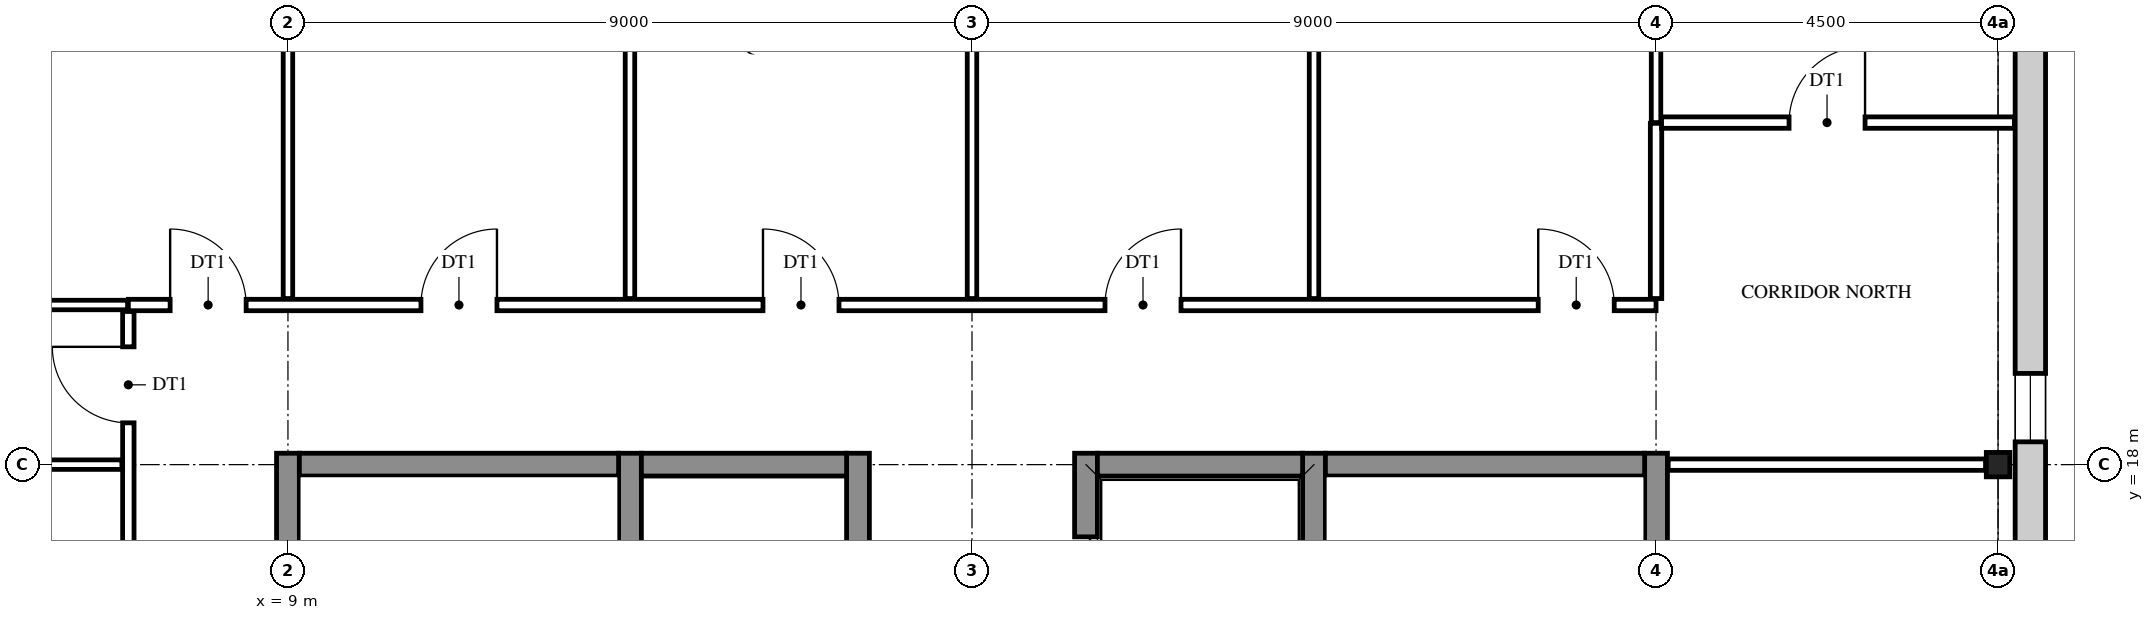
"""IFC4 building model, lengths in metres.
Left out: names, types, materials, properties, quantities, classifications, styles, units other than length and angle.
Written with IfcOpenShell. Run it as: python <this file> out.ifc"""

import sys

from ifc_helpers import new_model, si_unit, direction, frame, frame_2d, origin, origin_2d, place, context, subcontext, project, spatial, rectangle, i_section, extrude, element, fill, save


model = new_model("IFC4")
c1 = context("Model", 3, precision=1e-05, world=origin(), true_north=direction((0.0, 1.0)))
c2 = subcontext(c1, "Body", "Model", "MODEL_VIEW")
j1 = project(units=[si_unit("LENGTHUNIT", "METRE"), si_unit("PLANEANGLEUNIT", "RADIAN")], contexts=[c1])
p1 = place(None, origin())
s1 = spatial("IfcSite", under=j1, at=p1, CompositionType="ELEMENT")
p2 = place(p1, origin())
s2 = spatial("IfcBuilding", under=s1, at=p2, CompositionType="ELEMENT")
p3 = place(p2, frame((0.0, 0.0, 52.8)))
s3 = spatial("IfcBuildingStorey", under=s2, at=p3, CompositionType="ELEMENT", Elevation=52.8)
p4 = place(p3, frame((31.5, 18.0, 0.0), z_axis=(0.0, 0.0, 1.0), x_axis=(1.0, 0.0, 0.0)))
e1 = element("IfcColumn", 1, at=p4, inside=s3, PredefinedType="COLUMN", context=c2, shape_type="SweptSolid", body=[
    extrude(i_section(OverallWidth=0.309, OverallDepth=0.321, WebThickness=0.014, FlangeThickness=0.022, FilletRadius=0.017, at=origin_2d()), origin(), (0.0, 0.0, 1.0), 4.2),
])
for number, where, z_axis, x_axis in (
    (2, (9.0, 8.85, 0.0), (0.0, 0.0, 1.0), (0.0, 1.0, 0.0)),
    (3, (13.5, 8.85, 0.0), (0.0, 0.0, 1.0), (0.0, 1.0, 0.0)),
):
    element("IfcWall", number, at=place(p3, frame(where, z_axis=z_axis, x_axis=x_axis)), inside=s3, PredefinedType="SHEAR", context=c2, shape_type="SweptSolid", body=[
        extrude(rectangle(XDim=9.3, YDim=0.3, at=frame_2d((4.65, 0.0))), origin(), (0.0, 0.0, 1.0), 4.2),
    ])
p5 = place(p3, frame((16.5, 8.85, 0.0), z_axis=(0.0, 0.0, 1.0), x_axis=(0.0, 1.0, 0.0)))
e4 = element("IfcWall", 4, at=p5, inside=s3, PredefinedType="SHEAR", context=c2, shape_type="SweptSolid", body=[
    extrude(rectangle(XDim=9.3, YDim=0.3, at=frame_2d((4.65, 0.0))), origin(), (0.0, 0.0, 1.0), 4.2),
])
p6 = place(p5, frame((1.1, 0.0, 0.0)))
e5 = element("IfcOpeningElement", 5, at=p6, cuts=e4, PredefinedType="OPENING", context=c2, shape_type="SweptSolid", body=[
    extrude(rectangle(XDim=1.1, YDim=2.1, at=frame_2d((0.55, 1.05))), frame((0.0, 0.16, 0.0), z_axis=(0.0, -1.0, 0.0), x_axis=(1.0, 0.0, 0.0)), (0.0, 0.0, 1.0), 0.32),
])
p7 = place(p5, frame((4.1, 0.0, 0.0)))
e6 = element("IfcOpeningElement", 6, at=p7, cuts=e4, PredefinedType="OPENING", context=c2, shape_type="SweptSolid", body=[
    extrude(rectangle(XDim=1.1, YDim=2.1, at=frame_2d((0.55, 1.05))), frame((0.0, 0.16, 0.0), z_axis=(0.0, -1.0, 0.0), x_axis=(1.0, 0.0, 0.0)), (0.0, 0.0, 1.0), 0.32),
])
p8 = place(p3, frame((19.5, 8.85, 0.0), z_axis=(0.0, 0.0, 1.0), x_axis=(0.0, 1.0, 0.0)))
e7 = element("IfcWall", 7, at=p8, inside=s3, PredefinedType="SHEAR", context=c2, shape_type="SweptSolid", body=[
    extrude(rectangle(XDim=9.3, YDim=0.3, at=frame_2d((4.65, 0.0))), origin(), (0.0, 0.0, 1.0), 4.2),
])
p9 = place(p8, frame((3.95, 0.0, 0.0)))
e8 = element("IfcOpeningElement", 8, at=p9, cuts=e7, PredefinedType="OPENING", context=c2, shape_type="SweptSolid", body=[
    extrude(rectangle(XDim=1.4, YDim=2.1, at=frame_2d((0.7, 1.05))), frame((0.0, 0.16, 0.0), z_axis=(0.0, -1.0, 0.0), x_axis=(1.0, 0.0, 0.0)), (0.0, 0.0, 1.0), 0.32),
])
p10 = place(p8, frame((7.1, 0.0, 0.0)))
e9 = element("IfcOpeningElement", 9, at=p10, cuts=e7, PredefinedType="OPENING", context=c2, shape_type="SweptSolid", body=[
    extrude(rectangle(XDim=1.1, YDim=2.1, at=frame_2d((0.55, 1.05))), frame((0.0, 0.16, 0.0), z_axis=(0.0, -1.0, 0.0), x_axis=(1.0, 0.0, 0.0)), (0.0, 0.0, 1.0), 0.32),
])
for number, where, z_axis, x_axis in (
    (10, (22.5, 8.85, 0.0), (0.0, 0.0, 1.0), (0.0, 1.0, 0.0)),
    (11, (27.0, 8.85, 0.0), (0.0, 0.0, 1.0), (0.0, 1.0, 0.0)),
):
    element("IfcWall", number, at=place(p3, frame(where, z_axis=z_axis, x_axis=x_axis)), inside=s3, PredefinedType="SHEAR", context=c2, shape_type="SweptSolid", body=[
        extrude(rectangle(XDim=9.3, YDim=0.3, at=frame_2d((4.65, 0.0))), origin(), (0.0, 0.0, 1.0), 4.2),
    ])
p11 = place(p3, frame((9.15, 18.0, 0.0), z_axis=(0.0, 0.0, 1.0), x_axis=(1.0, 0.0, 0.0)))
e12 = element("IfcWall", 12, at=p11, inside=s3, PredefinedType="SHEAR", context=c2, shape_type="SweptSolid", body=[
    extrude(rectangle(XDim=4.2, YDim=0.3, at=frame_2d((2.1, 0.0))), origin(), (0.0, 0.0, 1.0), 4.2),
])
for number, where, z_axis, x_axis in (
    (13, (13.65, 18.0, 0.0), (0.0, 0.0, 1.0), (1.0, 0.0, 0.0)),
    (14, (19.65, 18.0, 0.0), (0.0, 0.0, 1.0), (1.0, 0.0, 0.0)),
):
    element("IfcWall", number, at=place(p3, frame(where, z_axis=z_axis, x_axis=x_axis)), inside=s3, PredefinedType="SHEAR", context=c2, shape_type="SweptSolid", body=[
        extrude(rectangle(XDim=2.7, YDim=0.3, at=frame_2d((1.35, 0.0))), origin(), (0.0, 0.0, 1.0), 4.2),
    ])
p12 = place(p3, frame((22.65, 18.0, 0.0), z_axis=(0.0, 0.0, 1.0), x_axis=(1.0, 0.0, 0.0)))
e15 = element("IfcWall", 15, at=p12, inside=s3, PredefinedType="SHEAR", context=c2, shape_type="SweptSolid", body=[
    extrude(rectangle(XDim=4.2, YDim=0.3, at=frame_2d((2.1, 0.0))), origin(), (0.0, 0.0, 1.0), 4.2),
])
p13 = place(p3, frame((31.925, 27.225, 0.0), z_axis=(0.0, 0.0, 1.0), x_axis=(0.0, -1.0, 0.0)))
e16 = element("IfcWall", 16, at=p13, inside=s3, PredefinedType="STANDARD", context=c2, shape_type="SweptSolid", body=[
    extrude(rectangle(XDim=27.45, YDim=0.4, at=frame_2d((13.725, 0.0))), origin(), (0.0, 0.0, 1.0), 4.2),
])
p14 = place(p13, frame((26.025, 0.0, 0.9)))
e17 = element("IfcOpeningElement", 17, at=p14, cuts=e16, PredefinedType="OPENING", context=c2, shape_type="SweptSolid", body=[
    extrude(rectangle(XDim=0.9, YDim=2.0, at=frame_2d((0.45, 1.0))), frame((0.0, 0.21, 0.0), z_axis=(0.0, -1.0, 0.0), x_axis=(1.0, 0.0, 0.0)), (0.0, 0.0, 1.0), 0.42),
])
p15 = place(p13, frame((18.525, 0.0, 0.9)))
e18 = element("IfcOpeningElement", 18, at=p15, cuts=e16, PredefinedType="OPENING", context=c2, shape_type="SweptSolid", body=[
    extrude(rectangle(XDim=0.9, YDim=2.0, at=frame_2d((0.45, 1.0))), frame((0.0, 0.21, 0.0), z_axis=(0.0, -1.0, 0.0), x_axis=(1.0, 0.0, 0.0)), (0.0, 0.0, 1.0), 0.42),
])
p16 = place(p13, frame((15.675, 0.0, 1.6)))
e19 = element("IfcOpeningElement", 19, at=p16, cuts=e16, PredefinedType="OPENING", context=c2, shape_type="SweptSolid", body=[
    extrude(rectangle(XDim=0.6, YDim=0.9, at=frame_2d((0.3, 0.45))), frame((0.0, 0.21, 0.0), z_axis=(0.0, -1.0, 0.0), x_axis=(1.0, 0.0, 0.0)), (0.0, 0.0, 1.0), 0.42),
])
p17 = place(p13, frame((11.175, 0.0, 1.6)))
e20 = element("IfcOpeningElement", 20, at=p17, cuts=e16, PredefinedType="OPENING", context=c2, shape_type="SweptSolid", body=[
    extrude(rectangle(XDim=0.6, YDim=0.9, at=frame_2d((0.3, 0.45))), frame((0.0, 0.21, 0.0), z_axis=(0.0, -1.0, 0.0), x_axis=(1.0, 0.0, 0.0)), (0.0, 0.0, 1.0), 0.42),
])
p18 = place(p13, frame((8.025, 0.0, 0.9)))
e21 = element("IfcOpeningElement", 21, at=p18, cuts=e16, PredefinedType="OPENING", context=c2, shape_type="SweptSolid", body=[
    extrude(rectangle(XDim=0.9, YDim=2.0, at=frame_2d((0.45, 1.0))), frame((0.0, 0.21, 0.0), z_axis=(0.0, -1.0, 0.0), x_axis=(1.0, 0.0, 0.0)), (0.0, 0.0, 1.0), 0.42),
])
p19 = place(p13, frame((0.525, 0.0, 0.9)))
e22 = element("IfcOpeningElement", 22, at=p19, cuts=e16, PredefinedType="OPENING", context=c2, shape_type="SweptSolid", body=[
    extrude(rectangle(XDim=0.9, YDim=2.0, at=frame_2d((0.45, 1.0))), frame((0.0, 0.21, 0.0), z_axis=(0.0, -1.0, 0.0), x_axis=(1.0, 0.0, 0.0)), (0.0, 0.0, 1.0), 0.42),
])
p20 = place(p3, frame((6.9, 6.985, 0.0), z_axis=(0.0, 0.0, 1.0), x_axis=(0.0, 1.0, 0.0)))
e23 = element("IfcWall", 23, at=p20, inside=s3, PredefinedType="PARTITIONING", context=c2, shape_type="SweptSolid", body=[
    extrude(rectangle(XDim=13.03, YDim=0.15, at=frame_2d((6.515, 0.0))), origin(), (0.0, 0.0, 1.0), 3.542),
])
p21 = place(p20, frame((11.565, 0.0, 0.0)))
e24 = element("IfcOpeningElement", 24, at=p21, cuts=e23, PredefinedType="OPENING", context=c2, shape_type="SweptSolid", body=[
    extrude(rectangle(XDim=1.0, YDim=2.1, at=frame_2d((0.5, 1.05))), frame((0.0, 0.085, 0.0), z_axis=(0.0, -1.0, 0.0), x_axis=(1.0, 0.0, 0.0)), (0.0, 0.0, 1.0), 0.17),
])
p22 = place(p20, frame((3.765, 0.0, 0.0)))
e25 = element("IfcOpeningElement", 25, at=p22, cuts=e23, PredefinedType="OPENING", context=c2, shape_type="SweptSolid", body=[
    extrude(rectangle(XDim=1.0, YDim=2.1, at=frame_2d((0.5, 1.05))), frame((0.0, 0.085, 0.0), z_axis=(0.0, -1.0, 0.0), x_axis=(1.0, 0.0, 0.0)), (0.0, 0.0, 1.0), 0.17),
])
p23 = place(p20, frame((8.265, 0.0, 0.0)))
e26 = element("IfcOpeningElement", 26, at=p23, cuts=e23, PredefinedType="OPENING", context=c2, shape_type="SweptSolid", body=[
    extrude(rectangle(XDim=1.0, YDim=2.1, at=frame_2d((0.5, 1.05))), frame((0.0, 0.085, 0.0), z_axis=(0.0, -1.0, 0.0), x_axis=(1.0, 0.0, 0.0)), (0.0, 0.0, 1.0), 0.17),
])
p24 = place(p3, frame((9.0, 20.185, 0.0), z_axis=(0.0, 0.0, 1.0), x_axis=(0.0, 1.0, 0.0)))
e27 = element("IfcWall", 27, at=p24, inside=s3, PredefinedType="PARTITIONING", context=c2, shape_type="SweptSolid", body=[
    extrude(rectangle(XDim=6.645, YDim=0.125, at=frame_2d((3.322, 0.0))), origin(), (0.0, 0.0, 1.0), 3.542),
])
p25 = place(p3, frame((13.5, 20.185, 0.0), z_axis=(0.0, 0.0, 1.0), x_axis=(0.0, 1.0, 0.0)))
e28 = element("IfcWall", 28, at=p25, inside=s3, PredefinedType="PARTITIONING", context=c2, shape_type="SweptSolid", body=[
    extrude(rectangle(XDim=7.041, YDim=0.125, at=frame_2d((3.521, 0.0))), origin(), (0.0, 0.0, 1.0), 3.542),
])
p26 = place(p3, frame((18.0, 20.185, 0.0), z_axis=(0.0, 0.0, 1.0), x_axis=(0.0, 1.0, 0.0)))
e29 = element("IfcWall", 29, at=p26, inside=s3, PredefinedType="PARTITIONING", context=c2, shape_type="SweptSolid", body=[
    extrude(rectangle(XDim=6.645, YDim=0.125, at=frame_2d((3.322, 0.0))), origin(), (0.0, 0.0, 1.0), 3.542),
])
p27 = place(p3, frame((22.5, 20.185, 0.0), z_axis=(0.0, 0.0, 1.0), x_axis=(0.0, 1.0, 0.0)))
e30 = element("IfcWall", 30, at=p27, inside=s3, PredefinedType="PARTITIONING", context=c2, shape_type="SweptSolid", body=[
    extrude(rectangle(XDim=7.041, YDim=0.125, at=frame_2d((3.521, 0.0))), origin(), (0.0, 0.0, 1.0), 3.542),
])
p28 = place(p3, frame((27.0, 20.185, 0.0), z_axis=(0.0, 0.0, 1.0), x_axis=(0.0, 1.0, 0.0)))
e31 = element("IfcWall", 31, at=p28, inside=s3, PredefinedType="PARTITIONING", context=c2, shape_type="SweptSolid", body=[
    extrude(rectangle(XDim=2.305, YDim=0.15, at=frame_2d((1.152, 0.0))), origin(), (0.0, 0.0, 1.0), 3.542),
])
p29 = place(p3, frame((27.0, 22.5, 0.0), z_axis=(0.0, 0.0, 1.0), x_axis=(0.0, 1.0, 0.0)))
e32 = element("IfcWall", 32, at=p29, inside=s3, PredefinedType="PARTITIONING", context=c2, shape_type="SweptSolid", body=[
    extrude(rectangle(XDim=4.33, YDim=0.125, at=frame_2d((2.165, 0.0))), origin(), (0.0, 0.0, 1.0), 3.542),
])
p30 = place(p3, frame((0.165, 18.0, 0.0), z_axis=(0.0, 0.0, 1.0), x_axis=(1.0, 0.0, 0.0)))
e33 = element("IfcWall", 33, at=p30, inside=s3, PredefinedType="PARTITIONING", context=c2, shape_type="SweptSolid", body=[
    extrude(rectangle(XDim=6.65, YDim=0.125, at=frame_2d((3.325, 0.0))), origin(), (0.0, 0.0, 1.0), 3.542),
])
p31 = place(p3, frame((27.16, 18.0, 0.0), z_axis=(0.0, 0.0, 1.0), x_axis=(1.0, 0.0, 0.0)))
e34 = element("IfcWall", 34, at=p31, inside=s3, PredefinedType="PARTITIONING", context=c2, shape_type="SweptSolid", body=[
    extrude(rectangle(XDim=4.176, YDim=0.15, at=frame_2d((2.088, 0.0))), origin(), (0.0, 0.0, 1.0), 3.542),
])
p32 = place(p3, frame((4.573, 20.1, 0.0), z_axis=(0.0, 0.0, 1.0), x_axis=(1.0, 0.0, 0.0)))
e35 = element("IfcWall", 35, at=p32, inside=s3, PredefinedType="PARTITIONING", context=c2, shape_type="SweptSolid", body=[
    extrude(rectangle(XDim=2.317, YDim=0.125, at=frame_2d((1.159, 0.0))), origin(), (0.0, 0.0, 1.0), 3.542),
])
p33 = place(p3, frame((6.9, 20.1, 0.0), z_axis=(0.0, 0.0, 1.0), x_axis=(1.0, 0.0, 0.0)))
e36 = element("IfcWall", 36, at=p33, inside=s3, PredefinedType="PARTITIONING", context=c2, shape_type="SweptSolid", body=[
    extrude(rectangle(XDim=20.1, YDim=0.15, at=frame_2d((10.05, 0.0))), origin(), (0.0, 0.0, 1.0), 3.542),
])
p34 = place(p33, frame((0.55, 0.0, 0.0)))
e37 = element("IfcOpeningElement", 37, at=p34, cuts=e36, PredefinedType="OPENING", context=c2, shape_type="SweptSolid", body=[
    extrude(rectangle(XDim=1.0, YDim=2.1, at=frame_2d((0.5, 1.05))), frame((0.0, 0.085, 0.0), z_axis=(0.0, -1.0, 0.0), x_axis=(1.0, 0.0, 0.0)), (0.0, 0.0, 1.0), 0.17),
])
p35 = place(p33, frame((3.85, 0.0, 0.0)))
e38 = element("IfcOpeningElement", 38, at=p35, cuts=e36, PredefinedType="OPENING", context=c2, shape_type="SweptSolid", body=[
    extrude(rectangle(XDim=1.0, YDim=2.1, at=frame_2d((0.5, 1.05))), frame((0.0, 0.085, 0.0), z_axis=(0.0, -1.0, 0.0), x_axis=(1.0, 0.0, 0.0)), (0.0, 0.0, 1.0), 0.17),
])
p36 = place(p33, frame((8.35, 0.0, 0.0)))
e39 = element("IfcOpeningElement", 39, at=p36, cuts=e36, PredefinedType="OPENING", context=c2, shape_type="SweptSolid", body=[
    extrude(rectangle(XDim=1.0, YDim=2.1, at=frame_2d((0.5, 1.05))), frame((0.0, 0.085, 0.0), z_axis=(0.0, -1.0, 0.0), x_axis=(1.0, 0.0, 0.0)), (0.0, 0.0, 1.0), 0.17),
])
p37 = place(p33, frame((12.85, 0.0, 0.0)))
e40 = element("IfcOpeningElement", 40, at=p37, cuts=e36, PredefinedType="OPENING", context=c2, shape_type="SweptSolid", body=[
    extrude(rectangle(XDim=1.0, YDim=2.1, at=frame_2d((0.5, 1.05))), frame((0.0, 0.085, 0.0), z_axis=(0.0, -1.0, 0.0), x_axis=(1.0, 0.0, 0.0)), (0.0, 0.0, 1.0), 0.17),
])
p38 = place(p33, frame((18.55, 0.0, 0.0)))
e41 = element("IfcOpeningElement", 41, at=p38, cuts=e36, PredefinedType="OPENING", context=c2, shape_type="SweptSolid", body=[
    extrude(rectangle(XDim=1.0, YDim=2.1, at=frame_2d((0.5, 1.05))), frame((0.0, 0.085, 0.0), z_axis=(0.0, -1.0, 0.0), x_axis=(1.0, 0.0, 0.0)), (0.0, 0.0, 1.0), 0.17),
])
p39 = place(p3, frame((27.073, 22.5, 0.0), z_axis=(0.0, 0.0, 1.0), x_axis=(1.0, 0.0, 0.0)))
e42 = element("IfcWall", 42, at=p39, inside=s3, PredefinedType="PARTITIONING", context=c2, shape_type="SweptSolid", body=[
    extrude(rectangle(XDim=4.643, YDim=0.15, at=frame_2d((2.321, 0.0))), origin(), (0.0, 0.0, 1.0), 3.542),
])
p40 = place(p39, frame((1.677, 0.0, 0.0)))
e43 = element("IfcOpeningElement", 43, at=p40, cuts=e42, PredefinedType="OPENING", context=c2, shape_type="SweptSolid", body=[
    extrude(rectangle(XDim=1.0, YDim=2.1, at=frame_2d((0.5, 1.05))), frame((0.0, 0.085, 0.0), z_axis=(0.0, -1.0, 0.0), x_axis=(1.0, 0.0, 0.0)), (0.0, 0.0, 1.0), 0.17),
])
p41 = place(p18, origin())
e44 = element("IfcWindow", 44, at=p41, inside=s3, PartitioningType="SINGLE_PANEL", PredefinedType="WINDOW", context=c2, shape_type="SweptSolid", body=[
    extrude(rectangle(XDim=0.9, YDim=2.0, at=frame_2d((0.45, 1.0))), frame((0.0, 0.03, 0.0), z_axis=(0.0, -1.0, 0.0), x_axis=(1.0, 0.0, 0.0)), (0.0, 0.0, 1.0), 0.06),
])
fill(e21, e44)
p42 = place(p21, origin())
e45 = element("IfcDoor", 45, at=p42, inside=s3, OperationType="SINGLE_SWING_RIGHT", PredefinedType="DOOR", context=c2, shape_type="SweptSolid", body=[
    extrude(rectangle(XDim=1.0, YDim=2.1, at=frame_2d((0.5, 1.05))), frame((0.0, 0.025, 0.0), z_axis=(0.0, -1.0, 0.0), x_axis=(1.0, 0.0, 0.0)), (0.0, 0.0, 1.0), 0.05),
])
fill(e24, e45)
p43 = place(p34, origin())
e46 = element("IfcDoor", 46, at=p43, inside=s3, OperationType="SINGLE_SWING_LEFT", PredefinedType="DOOR", context=c2, shape_type="SweptSolid", body=[
    extrude(rectangle(XDim=1.0, YDim=2.1, at=frame_2d((0.5, 1.05))), frame((0.0, 0.025, 0.0), z_axis=(0.0, -1.0, 0.0), x_axis=(1.0, 0.0, 0.0)), (0.0, 0.0, 1.0), 0.05),
])
fill(e37, e46)
p44 = place(p35, origin())
e47 = element("IfcDoor", 47, at=p44, inside=s3, OperationType="SINGLE_SWING_RIGHT", PredefinedType="DOOR", context=c2, shape_type="SweptSolid", body=[
    extrude(rectangle(XDim=1.0, YDim=2.1, at=frame_2d((0.5, 1.05))), frame((0.0, 0.025, 0.0), z_axis=(0.0, -1.0, 0.0), x_axis=(1.0, 0.0, 0.0)), (0.0, 0.0, 1.0), 0.05),
])
fill(e38, e47)
p45 = place(p36, origin())
e48 = element("IfcDoor", 48, at=p45, inside=s3, OperationType="SINGLE_SWING_LEFT", PredefinedType="DOOR", context=c2, shape_type="SweptSolid", body=[
    extrude(rectangle(XDim=1.0, YDim=2.1, at=frame_2d((0.5, 1.05))), frame((0.0, 0.025, 0.0), z_axis=(0.0, -1.0, 0.0), x_axis=(1.0, 0.0, 0.0)), (0.0, 0.0, 1.0), 0.05),
])
fill(e39, e48)
p46 = place(p37, origin())
e49 = element("IfcDoor", 49, at=p46, inside=s3, OperationType="SINGLE_SWING_RIGHT", PredefinedType="DOOR", context=c2, shape_type="SweptSolid", body=[
    extrude(rectangle(XDim=1.0, YDim=2.1, at=frame_2d((0.5, 1.05))), frame((0.0, 0.025, 0.0), z_axis=(0.0, -1.0, 0.0), x_axis=(1.0, 0.0, 0.0)), (0.0, 0.0, 1.0), 0.05),
])
fill(e40, e49)
p47 = place(p38, origin())
e50 = element("IfcDoor", 50, at=p47, inside=s3, OperationType="SINGLE_SWING_LEFT", PredefinedType="DOOR", context=c2, shape_type="SweptSolid", body=[
    extrude(rectangle(XDim=1.0, YDim=2.1, at=frame_2d((0.5, 1.05))), frame((0.0, 0.025, 0.0), z_axis=(0.0, -1.0, 0.0), x_axis=(1.0, 0.0, 0.0)), (0.0, 0.0, 1.0), 0.05),
])
fill(e41, e50)
p48 = place(p40, origin())
e51 = element("IfcDoor", 51, at=p48, inside=s3, OperationType="SINGLE_SWING_RIGHT", PredefinedType="DOOR", context=c2, shape_type="SweptSolid", body=[
    extrude(rectangle(XDim=1.0, YDim=2.1, at=frame_2d((0.5, 1.05))), frame((0.0, 0.025, 0.0), z_axis=(0.0, -1.0, 0.0), x_axis=(1.0, 0.0, 0.0)), (0.0, 0.0, 1.0), 0.05),
])
fill(e43, e51)
p49 = place(p10, origin())
e52 = element("IfcDoor", 52, at=p49, inside=s3, OperationType="DOUBLE_DOOR_SLIDING", PredefinedType="DOOR", context=c2, shape_type="SweptSolid", body=[
    extrude(rectangle(XDim=1.1, YDim=2.1, at=frame_2d((0.55, 1.05))), frame((0.0, 0.025, 0.0), z_axis=(0.0, -1.0, 0.0), x_axis=(1.0, 0.0, 0.0)), (0.0, 0.0, 1.0), 0.05),
])
fill(e9, e52)
save(model, sys.argv[1])
